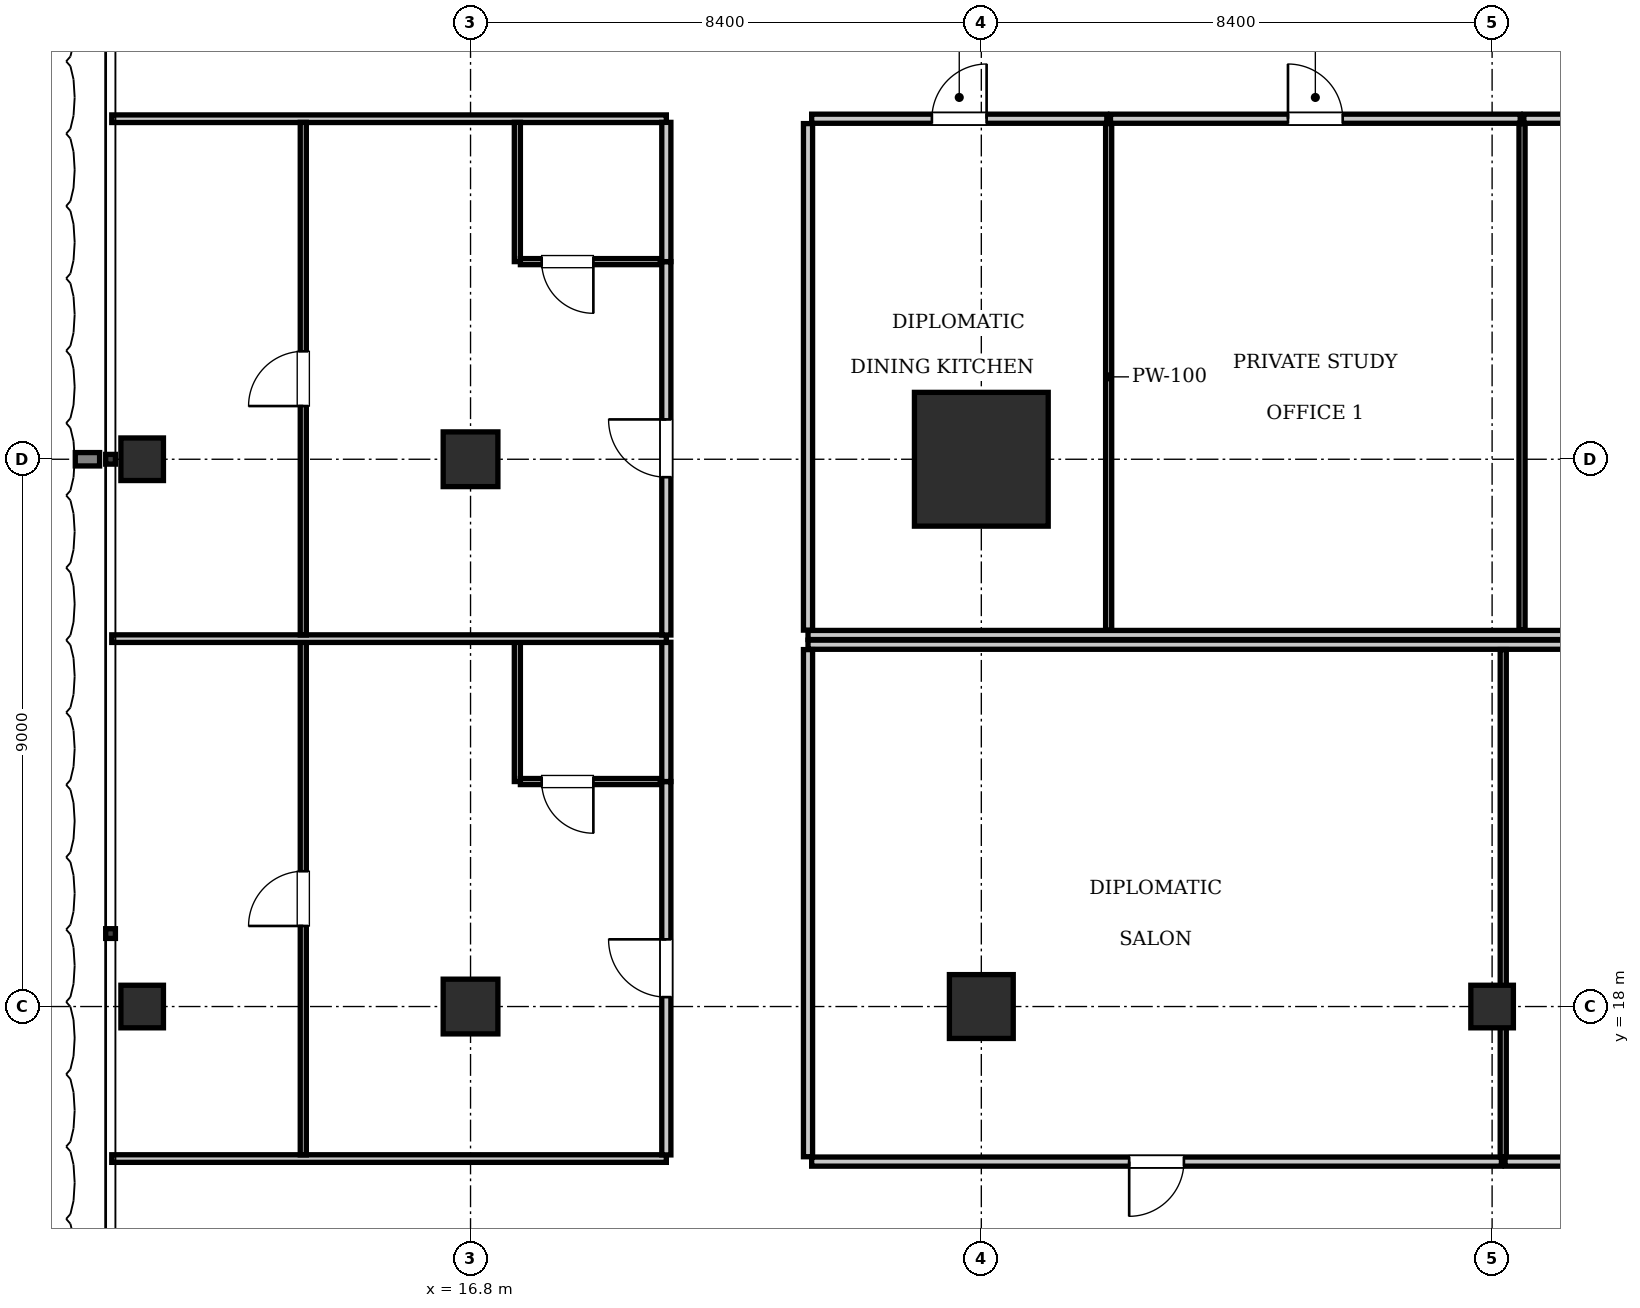
"""IFC4 building model, lengths in metres.
Left out: names, types, materials, properties, quantities, classifications, styles, units other than length and angle.
Written with IfcOpenShell. Run it as: python <this file> out.ifc"""

import sys

from ifc_helpers import new_model, si_unit, direction, frame, frame_2d, origin, origin_2d, place, context, subcontext, project, spatial, rectangle, i_section, extrude, element, fill, save


model = new_model("IFC4")
c1 = context("Model", 3, precision=1e-05, world=origin(), true_north=direction((0.0, 1.0)))
c2 = subcontext(c1, "Body", "Model", "MODEL_VIEW")
j1 = project(units=[si_unit("LENGTHUNIT", "METRE"), si_unit("PLANEANGLEUNIT", "RADIAN")], contexts=[c1])
p1 = place(None, origin())
s1 = spatial("IfcSite", under=j1, at=p1, CompositionType="ELEMENT")
p2 = place(p1, origin())
s2 = spatial("IfcBuilding", under=s1, at=p2, CompositionType="ELEMENT")
p3 = place(p2, frame((0.0, 0.0, 65.45)))
s3 = spatial("IfcBuildingStorey", under=s2, at=p3, CompositionType="ELEMENT", Elevation=65.45)
p4 = place(p3, frame((25.2, 27.0, 0.0), z_axis=(0.0, 0.0, 1.0), x_axis=(1.0, 0.0, 0.0)))
e1 = element("IfcColumn", 1, at=p4, inside=s3, PredefinedType="COLUMN", context=c2, shape_type="SweptSolid", body=[
    extrude(rectangle(XDim=2.2, YDim=2.2, at=origin_2d()), origin(), (0.0, 0.0, 1.0), 3.85),
])
p5 = place(p3, frame((25.2, 18.0, 0.0), z_axis=(0.0, 0.0, 1.0), x_axis=(1.0, 0.0, 0.0)))
e2 = element("IfcColumn", 2, at=p5, inside=s3, PredefinedType="COLUMN", context=c2, shape_type="SweptSolid", body=[
    extrude(rectangle(XDim=1.05, YDim=1.05, at=origin_2d()), origin(), (0.0, 0.0, 1.0), 3.85),
])
p6 = place(p3, frame((33.6, 18.0, 0.0), z_axis=(0.0, 0.0, 1.0), x_axis=(1.0, 0.0, 0.0)))
e3 = element("IfcColumn", 3, at=p6, inside=s3, PredefinedType="COLUMN", context=c2, shape_type="SweptSolid", body=[
    extrude(i_section(OverallWidth=0.7, OverallDepth=0.7, WebThickness=0.028, FlangeThickness=0.044, at=origin_2d()), origin(), (0.0, 0.0, 1.0), 3.85),
])
for number, where, z_axis, x_axis in (
    (4, (16.8, 18.0, 0.0), (0.0, 0.0, 1.0), (1.0, 0.0, 0.0)),
    (5, (16.8, 27.0, 0.0), (0.0, 0.0, 1.0), (1.0, 0.0, 0.0)),
):
    element("IfcColumn", number, at=place(p3, frame(where, z_axis=z_axis, x_axis=x_axis)), inside=s3, PredefinedType="COLUMN", context=c2, shape_type="SweptSolid", body=[
        extrude(rectangle(XDim=0.9, YDim=0.9, at=origin_2d()), origin(), (0.0, 0.0, 1.0), 3.85),
    ])
for number, where, z_axis, x_axis in (
    (6, (11.4, 18.0, 0.0), (0.0, 0.0, 1.0), (1.0, 0.0, 0.0)),
    (7, (11.4, 27.0, 0.0), (0.0, 0.0, 1.0), (1.0, 0.0, 0.0)),
):
    element("IfcColumn", number, at=place(p3, frame(where, z_axis=z_axis, x_axis=x_axis)), inside=s3, PredefinedType="COLUMN", context=c2, shape_type="SweptSolid", body=[
        extrude(i_section(OverallWidth=0.7, OverallDepth=0.7, WebThickness=0.028, FlangeThickness=0.044, at=origin_2d()), origin(), (0.0, 0.0, 1.0), 3.85),
    ])
p7 = place(p3, frame((22.35, 24.11, 0.0), z_axis=(0.0, 0.0, 1.0), x_axis=(1.0, 0.0, 0.0)))
e8 = element("IfcWall", 8, at=p7, inside=s3, PredefinedType="PARTITIONING", context=c2, shape_type="SweptSolid", body=[
    extrude(rectangle(XDim=30.9, YDim=0.15, at=frame_2d((15.45, 0.0))), origin(), (0.0, 0.0, 1.0), 3.61),
])
p8 = place(p3, frame((22.35, 24.19, 0.0), z_axis=(0.0, 0.0, 1.0), x_axis=(0.0, 1.0, 0.0)))
e9 = element("IfcWall", 9, at=p8, inside=s3, PredefinedType="PARTITIONING", context=c2, shape_type="SweptSolid", body=[
    extrude(rectangle(XDim=8.33, YDim=0.15, at=frame_2d((4.165, 0.0))), origin(), (0.0, 0.0, 1.0), 3.61),
])
p9 = place(p3, frame((22.41, 32.6, 0.0), z_axis=(0.0, 0.0, 1.0), x_axis=(1.0, 0.0, 0.0)))
e10 = element("IfcWall", 10, at=p9, inside=s3, PredefinedType="PARTITIONING", context=c2, shape_type="SweptSolid", body=[
    extrude(rectangle(XDim=4.854, YDim=0.15, at=frame_2d((2.427, 0.0))), origin(), (0.0, 0.0, 1.0), 3.61),
])
p10 = place(p9, frame((1.977, 0.0, 0.0)))
e11 = element("IfcOpeningElement", 11, at=p10, cuts=e10, PredefinedType="OPENING", context=c2, shape_type="SweptSolid", body=[
    extrude(rectangle(XDim=0.9, YDim=2.1, at=frame_2d((0.45, 1.05))), frame((0.0, 0.085, 0.0), z_axis=(0.0, -1.0, 0.0), x_axis=(1.0, 0.0, 0.0)), (0.0, 0.0, 1.0), 0.17),
])
p11 = place(p3, frame((27.294, 24.19, 0.0), z_axis=(0.0, 0.0, 1.0), x_axis=(0.0, 1.0, 0.0)))
e12 = element("IfcWall", 12, at=p11, inside=s3, PredefinedType="PARTITIONING", context=c2, shape_type="SweptSolid", body=[
    extrude(rectangle(XDim=8.33, YDim=0.1, at=frame_2d((4.165, 0.0))), origin(), (0.0, 0.0, 1.0), 3.61),
])
p12 = place(p3, frame((27.324, 32.6, 0.0), z_axis=(0.0, 0.0, 1.0), x_axis=(1.0, 0.0, 0.0)))
e13 = element("IfcWall", 13, at=p12, inside=s3, PredefinedType="PARTITIONING", context=c2, shape_type="SweptSolid", body=[
    extrude(rectangle(XDim=6.738, YDim=0.15, at=frame_2d((3.369, 0.0))), origin(), (0.0, 0.0, 1.0), 3.61),
])
p13 = place(p12, frame((2.919, 0.0, 0.0)))
e14 = element("IfcOpeningElement", 14, at=p13, cuts=e13, PredefinedType="OPENING", context=c2, shape_type="SweptSolid", body=[
    extrude(rectangle(XDim=0.9, YDim=2.1, at=frame_2d((0.45, 1.05))), frame((0.0, 0.085, 0.0), z_axis=(0.0, -1.0, 0.0), x_axis=(1.0, 0.0, 0.0)), (0.0, 0.0, 1.0), 0.17),
])
p14 = place(p3, frame((34.092, 24.19, 0.0), z_axis=(0.0, 0.0, 1.0), x_axis=(0.0, 1.0, 0.0)))
e15 = element("IfcWall", 15, at=p14, inside=s3, PredefinedType="PARTITIONING", context=c2, shape_type="SweptSolid", body=[
    extrude(rectangle(XDim=8.33, YDim=0.1, at=frame_2d((4.165, 0.0))), origin(), (0.0, 0.0, 1.0), 3.61),
])
p15 = place(p3, frame((34.122, 32.6, 0.0), z_axis=(0.0, 0.0, 1.0), x_axis=(1.0, 0.0, 0.0)))
e16 = element("IfcWall", 16, at=p15, inside=s3, PredefinedType="PARTITIONING", context=c2, shape_type="SweptSolid", body=[
    extrude(rectangle(XDim=8.592, YDim=0.15, at=frame_2d((4.296, 0.0))), origin(), (0.0, 0.0, 1.0), 3.61),
])
p16 = place(p15, frame((3.846, 0.0, 0.0)))
e17 = element("IfcOpeningElement", 17, at=p16, cuts=e16, PredefinedType="OPENING", context=c2, shape_type="SweptSolid", body=[
    extrude(rectangle(XDim=0.9, YDim=2.1, at=frame_2d((0.45, 1.05))), frame((0.0, 0.085, 0.0), z_axis=(0.0, -1.0, 0.0), x_axis=(1.0, 0.0, 0.0)), (0.0, 0.0, 1.0), 0.17),
])
p17 = place(p3, frame((22.35, 23.95, 0.0), z_axis=(0.0, 0.0, 1.0), x_axis=(1.0, 0.0, 0.0)))
e18 = element("IfcWall", 18, at=p17, inside=s3, PredefinedType="PARTITIONING", context=c2, shape_type="SweptSolid", body=[
    extrude(rectangle(XDim=30.9, YDim=0.15, at=frame_2d((15.45, 0.0))), origin(), (0.0, 0.0, 1.0), 3.61),
])
p18 = place(p3, frame((22.35, 15.53, 0.0), z_axis=(0.0, 0.0, 1.0), x_axis=(0.0, 1.0, 0.0)))
e19 = element("IfcWall", 19, at=p18, inside=s3, PredefinedType="PARTITIONING", context=c2, shape_type="SweptSolid", body=[
    extrude(rectangle(XDim=8.34, YDim=0.15, at=frame_2d((4.17, 0.0))), origin(), (0.0, 0.0, 1.0), 3.61),
])
p19 = place(p3, frame((22.41, 15.45, 0.0), z_axis=(0.0, 0.0, 1.0), x_axis=(1.0, 0.0, 0.0)))
e20 = element("IfcWall", 20, at=p19, inside=s3, PredefinedType="PARTITIONING", context=c2, shape_type="SweptSolid", body=[
    extrude(rectangle(XDim=11.343, YDim=0.15, at=frame_2d((5.671, 0.0))), origin(), (0.0, 0.0, 1.0), 3.61),
])
p20 = place(p19, frame((5.221, 0.0, 0.0)))
e21 = element("IfcOpeningElement", 21, at=p20, cuts=e20, PredefinedType="OPENING", context=c2, shape_type="SweptSolid", body=[
    extrude(rectangle(XDim=0.9, YDim=2.1, at=frame_2d((0.45, 1.05))), frame((0.0, 0.085, 0.0), z_axis=(0.0, -1.0, 0.0), x_axis=(1.0, 0.0, 0.0)), (0.0, 0.0, 1.0), 0.17),
])
p21 = place(p3, frame((33.783, 15.53, 0.0), z_axis=(0.0, 0.0, 1.0), x_axis=(0.0, 1.0, 0.0)))
e22 = element("IfcWall", 22, at=p21, inside=s3, PredefinedType="PARTITIONING", context=c2, shape_type="SweptSolid", body=[
    extrude(rectangle(XDim=8.34, YDim=0.1, at=frame_2d((4.17, 0.0))), origin(), (0.0, 0.0, 1.0), 2.988),
])
p22 = place(p3, frame((33.813, 15.45, 0.0), z_axis=(0.0, 0.0, 1.0), x_axis=(1.0, 0.0, 0.0)))
e23 = element("IfcWall", 23, at=p22, inside=s3, PredefinedType="PARTITIONING", context=c2, shape_type="SweptSolid", body=[
    extrude(rectangle(XDim=19.377, YDim=0.15, at=frame_2d((9.688, 0.0))), origin(), (0.0, 0.0, 1.0), 3.61),
])
p23 = place(p22, frame((9.239, 0.0, 0.0)))
e24 = element("IfcOpeningElement", 24, at=p23, cuts=e23, PredefinedType="OPENING", context=c2, shape_type="SweptSolid", body=[
    extrude(rectangle(XDim=0.9, YDim=2.1, at=frame_2d((0.45, 1.05))), frame((0.0, 0.085, 0.0), z_axis=(0.0, -1.0, 0.0), x_axis=(1.0, 0.0, 0.0)), (0.0, 0.0, 1.0), 0.17),
])
for number, where, z_axis, x_axis in (
    (25, (10.9, 15.5, 0.0), (0.0, 0.0, 1.0), (1.0, 0.0, 0.0)),
    (26, (10.9, 32.6, 0.0), (0.0, 0.0, 1.0), (1.0, 0.0, 0.0)),
):
    element("IfcWall", number, at=place(p3, frame(where, z_axis=z_axis, x_axis=x_axis)), inside=s3, PredefinedType="PARTITIONING", context=c2, shape_type="SweptSolid", body=[
        extrude(rectangle(XDim=9.12, YDim=0.125, at=frame_2d((4.56, 0.0))), origin(), (0.0, 0.0, 1.0), 3.61),
    ])
p24 = place(p3, frame((20.02, 15.56, 0.0), z_axis=(0.0, 0.0, 1.0), x_axis=(0.0, 1.0, 0.0)))
e27 = element("IfcWall", 27, at=p24, inside=s3, PredefinedType="PARTITIONING", context=c2, shape_type="SweptSolid", body=[
    extrude(rectangle(XDim=6.14, YDim=0.15, at=frame_2d((3.07, 0.0))), origin(), (0.0, 0.0, 1.0), 3.61),
])
p25 = place(p24, frame((2.595, 0.0, 0.0)))
e28 = element("IfcOpeningElement", 28, at=p25, cuts=e27, PredefinedType="OPENING", context=c2, shape_type="SweptSolid", body=[
    extrude(rectangle(XDim=0.95, YDim=2.15, at=frame_2d((0.475, 1.075))), frame((0.0, 0.085, 0.0), z_axis=(0.0, -1.0, 0.0), x_axis=(1.0, 0.0, 0.0)), (0.0, 0.0, 1.0), 0.17),
])
p26 = place(p3, frame((20.02, 21.7, 0.0), z_axis=(0.0, 0.0, 1.0), x_axis=(0.0, 1.0, 0.0)))
e29 = element("IfcWall", 29, at=p26, inside=s3, PredefinedType="PARTITIONING", context=c2, shape_type="SweptSolid", body=[
    extrude(rectangle(XDim=2.29, YDim=0.15, at=frame_2d((1.145, 0.0))), origin(), (0.0, 0.0, 1.0), 3.61),
])
p27 = place(p3, frame((17.57, 21.7, 0.0), z_axis=(0.0, 0.0, 1.0), x_axis=(0.0, 1.0, 0.0)))
e30 = element("IfcWall", 30, at=p27, inside=s3, PredefinedType="PARTITIONING", context=c2, shape_type="SweptSolid", body=[
    extrude(rectangle(XDim=2.29, YDim=0.1, at=frame_2d((1.145, 0.0))), origin(), (0.0, 0.0, 1.0), 3.61),
])
p28 = place(p3, frame((17.62, 21.7, 0.0), z_axis=(0.0, 0.0, 1.0), x_axis=(1.0, 0.0, 0.0)))
e31 = element("IfcWall", 31, at=p28, inside=s3, PredefinedType="PARTITIONING", context=c2, shape_type="SweptSolid", body=[
    extrude(rectangle(XDim=2.3, YDim=0.1, at=frame_2d((1.15, 0.0))), origin(), (0.0, 0.0, 1.0), 3.61),
])
p29 = place(p28, frame((0.35, 0.0, 0.0)))
e32 = element("IfcOpeningElement", 32, at=p29, cuts=e31, PredefinedType="OPENING", context=c2, shape_type="SweptSolid", body=[
    extrude(rectangle(XDim=0.85, YDim=2.1, at=frame_2d((0.425, 1.05))), frame((0.0, 0.06, 0.0), z_axis=(0.0, -1.0, 0.0), x_axis=(1.0, 0.0, 0.0)), (0.0, 0.0, 1.0), 0.12),
])
p30 = place(p3, frame((14.05, 15.56, 0.0), z_axis=(0.0, 0.0, 1.0), x_axis=(0.0, 1.0, 0.0)))
e33 = element("IfcWall", 33, at=p30, inside=s3, PredefinedType="PARTITIONING", context=c2, shape_type="SweptSolid", body=[
    extrude(rectangle(XDim=8.43, YDim=0.1, at=frame_2d((4.215, 0.0))), origin(), (0.0, 0.0, 1.0), 3.352),
])
p31 = place(p30, frame((3.765, 0.0, 0.0)))
e34 = element("IfcOpeningElement", 34, at=p31, cuts=e33, PredefinedType="OPENING", context=c2, shape_type="SweptSolid", body=[
    extrude(rectangle(XDim=0.9, YDim=2.1, at=frame_2d((0.45, 1.05))), frame((0.0, 0.06, 0.0), z_axis=(0.0, -1.0, 0.0), x_axis=(1.0, 0.0, 0.0)), (0.0, 0.0, 1.0), 0.12),
])
p32 = place(p3, frame((10.9, 24.05, 0.0), z_axis=(0.0, 0.0, 1.0), x_axis=(1.0, 0.0, 0.0)))
e35 = element("IfcWall", 35, at=p32, inside=s3, PredefinedType="PARTITIONING", context=c2, shape_type="SweptSolid", body=[
    extrude(rectangle(XDim=9.12, YDim=0.125, at=frame_2d((4.56, 0.0))), origin(), (0.0, 0.0, 1.0), 3.61),
])
p33 = place(p3, frame((20.02, 24.11, 0.0), z_axis=(0.0, 0.0, 1.0), x_axis=(0.0, 1.0, 0.0)))
e36 = element("IfcWall", 36, at=p33, inside=s3, PredefinedType="PARTITIONING", context=c2, shape_type="SweptSolid", body=[
    extrude(rectangle(XDim=6.14, YDim=0.15, at=frame_2d((3.07, 0.0))), origin(), (0.0, 0.0, 1.0), 3.61),
])
p34 = place(p33, frame((2.595, 0.0, 0.0)))
e37 = element("IfcOpeningElement", 37, at=p34, cuts=e36, PredefinedType="OPENING", context=c2, shape_type="SweptSolid", body=[
    extrude(rectangle(XDim=0.95, YDim=2.15, at=frame_2d((0.475, 1.075))), frame((0.0, 0.085, 0.0), z_axis=(0.0, -1.0, 0.0), x_axis=(1.0, 0.0, 0.0)), (0.0, 0.0, 1.0), 0.17),
])
p35 = place(p3, frame((20.02, 30.25, 0.0), z_axis=(0.0, 0.0, 1.0), x_axis=(0.0, 1.0, 0.0)))
e38 = element("IfcWall", 38, at=p35, inside=s3, PredefinedType="PARTITIONING", context=c2, shape_type="SweptSolid", body=[
    extrude(rectangle(XDim=2.29, YDim=0.15, at=frame_2d((1.145, 0.0))), origin(), (0.0, 0.0, 1.0), 3.61),
])
p36 = place(p3, frame((17.57, 30.25, 0.0), z_axis=(0.0, 0.0, 1.0), x_axis=(0.0, 1.0, 0.0)))
e39 = element("IfcWall", 39, at=p36, inside=s3, PredefinedType="PARTITIONING", context=c2, shape_type="SweptSolid", body=[
    extrude(rectangle(XDim=2.29, YDim=0.1, at=frame_2d((1.145, 0.0))), origin(), (0.0, 0.0, 1.0), 3.61),
])
p37 = place(p3, frame((17.62, 30.25, 0.0), z_axis=(0.0, 0.0, 1.0), x_axis=(1.0, 0.0, 0.0)))
e40 = element("IfcWall", 40, at=p37, inside=s3, PredefinedType="PARTITIONING", context=c2, shape_type="SweptSolid", body=[
    extrude(rectangle(XDim=2.3, YDim=0.1, at=frame_2d((1.15, 0.0))), origin(), (0.0, 0.0, 1.0), 3.61),
])
p38 = place(p37, frame((0.35, 0.0, 0.0)))
e41 = element("IfcOpeningElement", 41, at=p38, cuts=e40, PredefinedType="OPENING", context=c2, shape_type="SweptSolid", body=[
    extrude(rectangle(XDim=0.85, YDim=2.1, at=frame_2d((0.425, 1.05))), frame((0.0, 0.06, 0.0), z_axis=(0.0, -1.0, 0.0), x_axis=(1.0, 0.0, 0.0)), (0.0, 0.0, 1.0), 0.12),
])
p39 = place(p3, frame((14.05, 24.11, 0.0), z_axis=(0.0, 0.0, 1.0), x_axis=(0.0, 1.0, 0.0)))
e42 = element("IfcWall", 42, at=p39, inside=s3, PredefinedType="PARTITIONING", context=c2, shape_type="SweptSolid", body=[
    extrude(rectangle(XDim=8.43, YDim=0.1, at=frame_2d((4.215, 0.0))), origin(), (0.0, 0.0, 1.0), 3.403),
])
p40 = place(p39, frame((3.765, 0.0, 0.0)))
e43 = element("IfcOpeningElement", 43, at=p40, cuts=e42, PredefinedType="OPENING", context=c2, shape_type="SweptSolid", body=[
    extrude(rectangle(XDim=0.9, YDim=2.1, at=frame_2d((0.45, 1.05))), frame((0.0, 0.06, 0.0), z_axis=(0.0, -1.0, 0.0), x_axis=(1.0, 0.0, 0.0)), (0.0, 0.0, 1.0), 0.12),
])
p41 = place(p10, origin())
e44 = element("IfcDoor", 44, at=p41, inside=s3, OperationType="SINGLE_SWING_RIGHT", PredefinedType="DOOR", context=c2, shape_type="SweptSolid", body=[
    extrude(rectangle(XDim=0.9, YDim=2.1, at=frame_2d((0.45, 1.05))), frame((0.0, 0.025, 0.0), z_axis=(0.0, -1.0, 0.0), x_axis=(1.0, 0.0, 0.0)), (0.0, 0.0, 1.0), 0.05),
])
fill(e11, e44)
p42 = place(p13, origin())
e45 = element("IfcDoor", 45, at=p42, inside=s3, OperationType="SINGLE_SWING_LEFT", PredefinedType="DOOR", context=c2, shape_type="SweptSolid", body=[
    extrude(rectangle(XDim=0.9, YDim=2.1, at=frame_2d((0.45, 1.05))), frame((0.0, 0.025, 0.0), z_axis=(0.0, -1.0, 0.0), x_axis=(1.0, 0.0, 0.0)), (0.0, 0.0, 1.0), 0.05),
])
fill(e14, e45)
p43 = place(p20, frame((0.9, 0.0, 0.0), z_axis=(0.0, 0.0, 1.0), x_axis=(-1.0, 0.0, 0.0)))
e46 = element("IfcDoor", 46, at=p43, inside=s3, OperationType="SINGLE_SWING_RIGHT", PredefinedType="DOOR", context=c2, shape_type="SweptSolid", body=[
    extrude(rectangle(XDim=0.9, YDim=2.1, at=frame_2d((0.45, 1.05))), frame((0.0, 0.025, 0.0), z_axis=(0.0, -1.0, 0.0), x_axis=(1.0, 0.0, 0.0)), (0.0, 0.0, 1.0), 0.05),
])
fill(e21, e46)
p44 = place(p29, frame((0.85, 0.0, 0.0), z_axis=(0.0, 0.0, 1.0), x_axis=(-1.0, 0.0, 0.0)))
e47 = element("IfcDoor", 47, at=p44, inside=s3, OperationType="SINGLE_SWING_LEFT", PredefinedType="DOOR", context=c2, shape_type="SweptSolid", body=[
    extrude(rectangle(XDim=0.85, YDim=2.1, at=frame_2d((0.425, 1.05))), frame((0.0, 0.025, 0.0), z_axis=(0.0, -1.0, 0.0), x_axis=(1.0, 0.0, 0.0)), (0.0, 0.0, 1.0), 0.05),
])
fill(e32, e47)
p45 = place(p25, origin())
e48 = element("IfcDoor", 48, at=p45, inside=s3, OperationType="SINGLE_SWING_RIGHT", PredefinedType="DOOR", context=c2, shape_type="SweptSolid", body=[
    extrude(rectangle(XDim=0.95, YDim=2.15, at=frame_2d((0.475, 1.075))), frame((0.0, 0.025, 0.0), z_axis=(0.0, -1.0, 0.0), x_axis=(1.0, 0.0, 0.0)), (0.0, 0.0, 1.0), 0.05),
])
fill(e28, e48)
p46 = place(p31, origin())
e49 = element("IfcDoor", 49, at=p46, inside=s3, OperationType="SINGLE_SWING_LEFT", PredefinedType="DOOR", context=c2, shape_type="SweptSolid", body=[
    extrude(rectangle(XDim=0.9, YDim=2.1, at=frame_2d((0.45, 1.05))), frame((0.0, 0.025, 0.0), z_axis=(0.0, -1.0, 0.0), x_axis=(1.0, 0.0, 0.0)), (0.0, 0.0, 1.0), 0.05),
])
fill(e34, e49)
p47 = place(p38, frame((0.85, 0.0, 0.0), z_axis=(0.0, 0.0, 1.0), x_axis=(-1.0, 0.0, 0.0)))
e50 = element("IfcDoor", 50, at=p47, inside=s3, OperationType="SINGLE_SWING_LEFT", PredefinedType="DOOR", context=c2, shape_type="SweptSolid", body=[
    extrude(rectangle(XDim=0.85, YDim=2.1, at=frame_2d((0.425, 1.05))), frame((0.0, 0.025, 0.0), z_axis=(0.0, -1.0, 0.0), x_axis=(1.0, 0.0, 0.0)), (0.0, 0.0, 1.0), 0.05),
])
fill(e41, e50)
p48 = place(p34, origin())
e51 = element("IfcDoor", 51, at=p48, inside=s3, OperationType="SINGLE_SWING_RIGHT", PredefinedType="DOOR", context=c2, shape_type="SweptSolid", body=[
    extrude(rectangle(XDim=0.95, YDim=2.15, at=frame_2d((0.475, 1.075))), frame((0.0, 0.025, 0.0), z_axis=(0.0, -1.0, 0.0), x_axis=(1.0, 0.0, 0.0)), (0.0, 0.0, 1.0), 0.05),
])
fill(e37, e51)
p49 = place(p40, origin())
e52 = element("IfcDoor", 52, at=p49, inside=s3, OperationType="SINGLE_SWING_LEFT", PredefinedType="DOOR", context=c2, shape_type="SweptSolid", body=[
    extrude(rectangle(XDim=0.9, YDim=2.1, at=frame_2d((0.45, 1.05))), frame((0.0, 0.025, 0.0), z_axis=(0.0, -1.0, 0.0), x_axis=(1.0, 0.0, 0.0)), (0.0, 0.0, 1.0), 0.05),
])
fill(e43, e52)
save(model, sys.argv[1])
